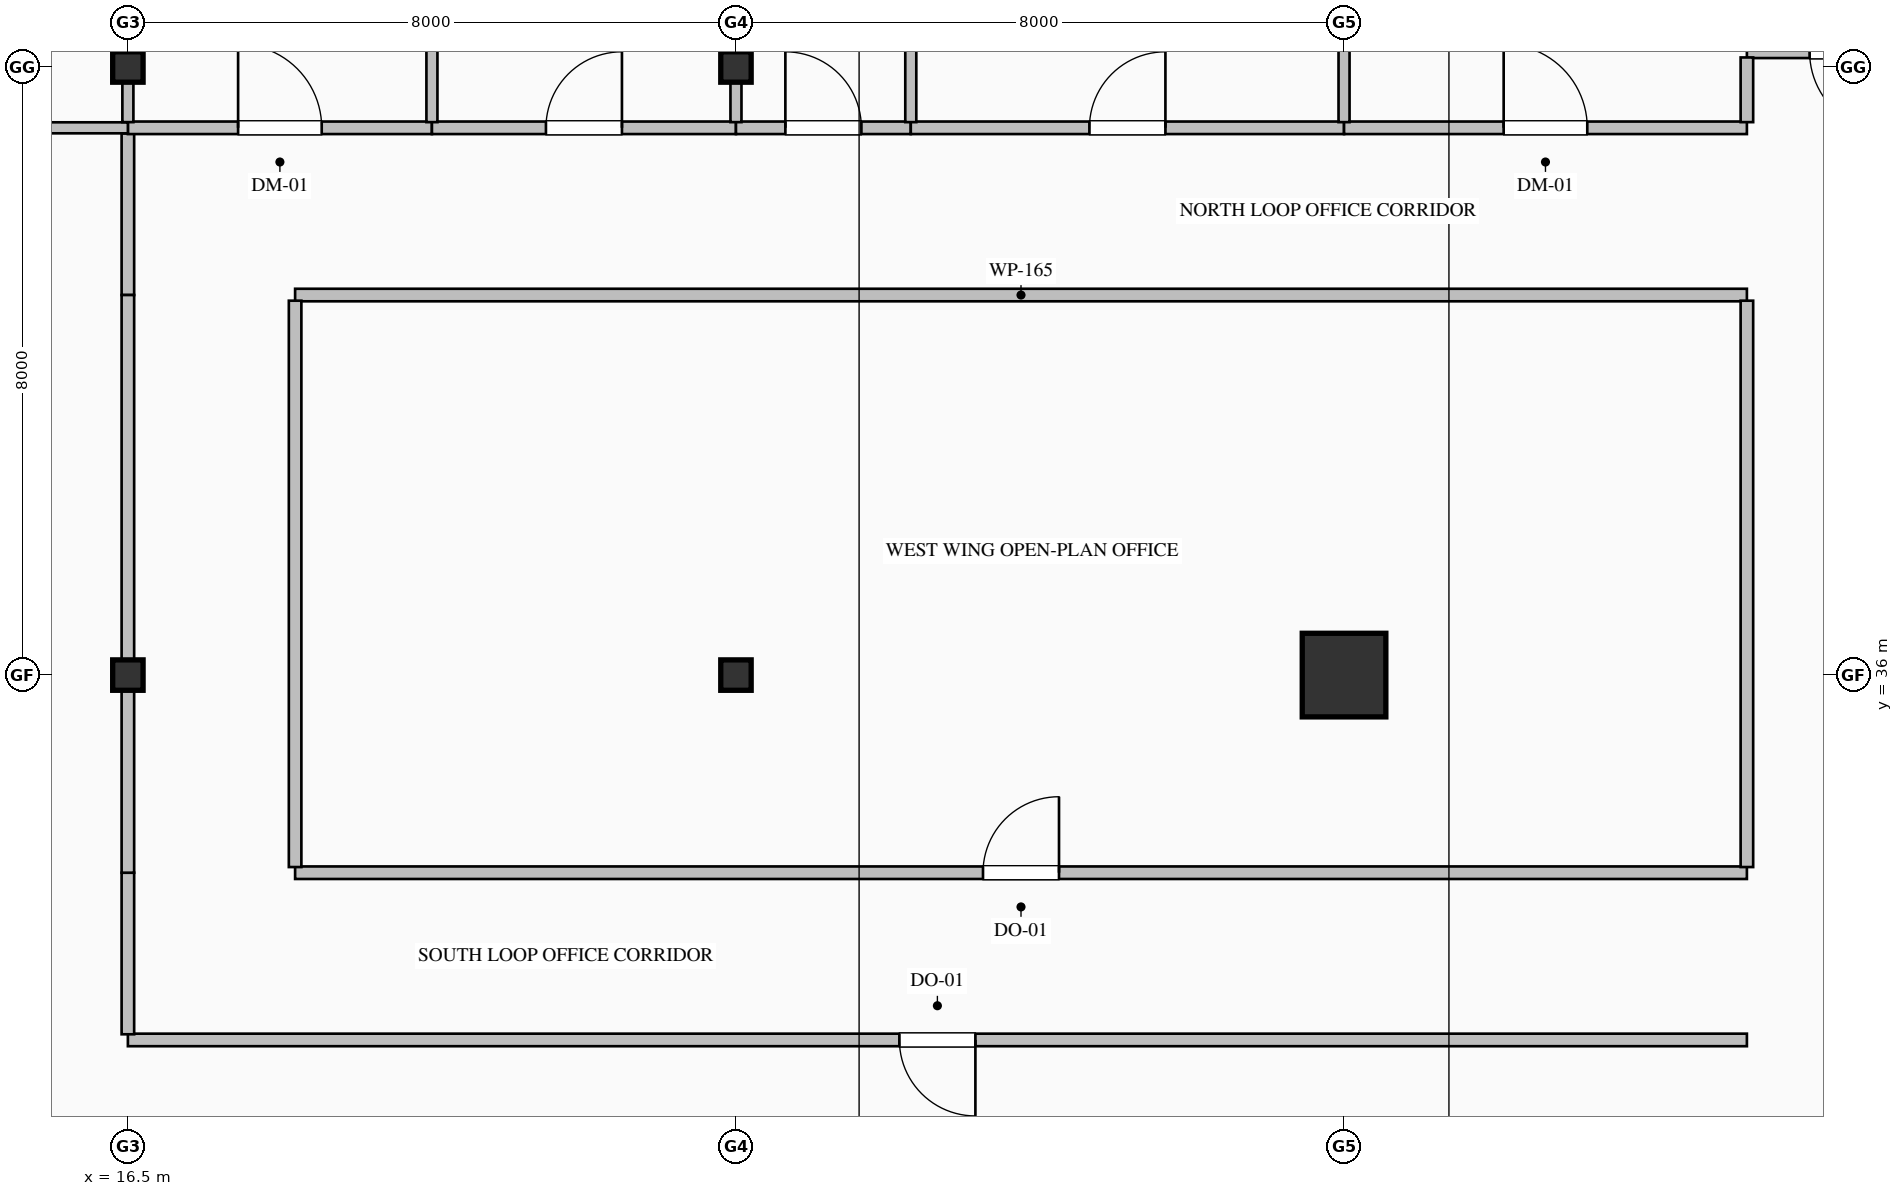
"""IFC4 building model, lengths in metres.
Left out: names, types, materials, properties, quantities, classifications, styles, units other than length and angle.
Written with IfcOpenShell. Run it as: python <this file> out.ifc"""

import sys

from ifc_helpers import new_model, si_unit, direction, frame, frame_2d, origin, origin_2d, place, context, subcontext, project, spatial, rectangle, hollow_rectangle, i_section, extrude, element, fill, save


model = new_model("IFC4")
c1 = context("Model", 3, precision=1e-05, world=origin(), true_north=direction((0.0, 1.0)))
c2 = subcontext(c1, "Body", "Model", "MODEL_VIEW")
j1 = project(units=[si_unit("LENGTHUNIT", "METRE"), si_unit("PLANEANGLEUNIT", "RADIAN")], contexts=[c1])
p1 = place(None, origin())
s1 = spatial("IfcSite", under=j1, at=p1, CompositionType="ELEMENT")
p2 = place(p1, origin())
s2 = spatial("IfcBuilding", under=s1, at=p2, CompositionType="ELEMENT")
p3 = place(p2, frame((0.0, 0.0, 119.0)))
s3 = spatial("IfcBuildingStorey", under=s2, at=p3, CompositionType="ELEMENT", Elevation=119.0)
for number, where, z_axis, x_axis in (
    (1, (16.5, 36.0, 0.0), (0.0, 0.0, 1.0), (1.0, 0.0, 0.0)),
    (2, (16.5, 44.0, 0.0), (0.0, 0.0, 1.0), (1.0, 0.0, 0.0)),
    (3, (24.5, 36.0, 0.0), (0.0, 0.0, 1.0), (1.0, 0.0, 0.0)),
    (4, (24.5, 44.0, 0.0), (0.0, 0.0, 1.0), (1.0, 0.0, 0.0)),
):
    element("IfcColumn", number, at=place(p3, frame(where, z_axis=z_axis, x_axis=x_axis)), inside=s3, PredefinedType="COLUMN", context=c2, shape_type="SweptSolid", body=[
        extrude(i_section(OverallWidth=0.4, OverallDepth=0.4, WebThickness=0.013, FlangeThickness=0.021, FilletRadius=0.022, at=origin_2d()), origin(), (0.0, 0.0, 1.0), 4.0),
    ])
p4 = place(p3, frame((32.5, 36.0, 0.0), z_axis=(0.0, 0.0, 1.0), x_axis=(1.0, 0.0, 0.0)))
e5 = element("IfcColumn", 5, at=p4, inside=s3, PredefinedType="COLUMN", context=c2, shape_type="SweptSolid", body=[
    extrude(hollow_rectangle(XDim=1.1, YDim=1.1, WallThickness=0.04, at=origin_2d()), origin(), (0.0, 0.0, 1.0), 4.0),
])
p5 = place(p3, frame((40.5, 44.2, 0.0), z_axis=(0.0, 0.0, 1.0), x_axis=(-1.0, 0.0, 0.0)))
e6 = element("IfcWall", 6, at=p5, inside=s3, PredefinedType="PARTITIONING", context=c2, shape_type="SweptSolid", body=[
    extrude(rectangle(XDim=2.7, YDim=0.165, at=frame_2d((1.35, 0.0))), origin(), (0.0, 0.0, 1.0), 3.765),
])
p6 = place(p5, frame((0.825, 0.0, 0.0)))
e7 = element("IfcOpeningElement", 7, at=p6, cuts=e6, PredefinedType="OPENING", context=c2, shape_type="SweptSolid", body=[
    extrude(rectangle(XDim=1.05, YDim=2.15, at=frame_2d((0.525, 1.075))), frame((0.0, 0.093, 0.0), z_axis=(0.0, -1.0, 0.0), x_axis=(1.0, 0.0, 0.0)), (0.0, 0.0, 1.0), 0.185),
])
p7 = place(p3, frame((37.8, 31.2, 0.0), z_axis=(0.0, 0.0, 1.0), x_axis=(-1.0, 0.0, 0.0)))
e8 = element("IfcWall", 8, at=p7, inside=s3, PredefinedType="PARTITIONING", context=c2, shape_type="SweptSolid", body=[
    extrude(rectangle(XDim=21.3, YDim=0.165, at=frame_2d((10.65, 0.0))), origin(), (0.0, 0.0, 1.0), 3.765),
])
p8 = place(p7, frame((10.15, 0.0, 0.0)))
e9 = element("IfcOpeningElement", 9, at=p8, cuts=e8, PredefinedType="OPENING", context=c2, shape_type="SweptSolid", body=[
    extrude(rectangle(XDim=1.0, YDim=2.15, at=frame_2d((0.5, 1.075))), frame((0.0, 0.093, 0.0), z_axis=(0.0, -1.0, 0.0), x_axis=(1.0, 0.0, 0.0)), (0.0, 0.0, 1.0), 0.185),
])
p9 = place(p3, frame((16.5, 31.274, 0.0), z_axis=(0.0, 0.0, 1.0), x_axis=(0.0, 1.0, 0.0)))
e10 = element("IfcWall", 10, at=p9, inside=s3, PredefinedType="PARTITIONING", context=c2, shape_type="SweptSolid", body=[
    extrude(rectangle(XDim=2.125, YDim=0.165, at=frame_2d((1.063, 0.0))), origin(), (0.0, 0.0, 1.0), 3.157),
])
p10 = place(p3, frame((18.7, 33.4, 0.0), z_axis=(0.0, 0.0, 1.0), x_axis=(1.0, 0.0, 0.0)))
e11 = element("IfcWall", 11, at=p10, inside=s3, PredefinedType="PARTITIONING", context=c2, shape_type="SweptSolid", body=[
    extrude(rectangle(XDim=19.1, YDim=0.165, at=frame_2d((9.55, 0.0))), origin(), (0.0, 0.0, 1.0), 3.765),
])
p11 = place(p10, frame((9.05, 0.0, 0.0)))
e12 = element("IfcOpeningElement", 12, at=p11, cuts=e11, PredefinedType="OPENING", context=c2, shape_type="SweptSolid", body=[
    extrude(rectangle(XDim=1.0, YDim=2.15, at=frame_2d((0.5, 1.075))), frame((0.0, 0.093, 0.0), z_axis=(0.0, -1.0, 0.0), x_axis=(1.0, 0.0, 0.0)), (0.0, 0.0, 1.0), 0.185),
])
p12 = place(p3, frame((16.5, 41.0, 0.0), z_axis=(0.0, 0.0, 1.0), x_axis=(0.0, 1.0, 0.0)))
e13 = element("IfcWall", 13, at=p12, inside=s3, PredefinedType="PARTITIONING", context=c2, shape_type="SweptSolid", body=[
    extrude(rectangle(XDim=2.125, YDim=0.165, at=frame_2d((1.063, 0.0))), origin(), (0.0, 0.0, 1.0), 3.157),
])
p13 = place(p3, frame((37.8, 41.0, 0.0), z_axis=(0.0, 0.0, 1.0), x_axis=(-1.0, 0.0, 0.0)))
e14 = element("IfcWall", 14, at=p13, inside=s3, PredefinedType="PARTITIONING", context=c2, shape_type="SweptSolid", body=[
    extrude(rectangle(XDim=19.1, YDim=0.165, at=frame_2d((9.55, 0.0))), origin(), (0.0, 0.0, 1.0), 3.765),
])
p14 = place(p3, frame((16.5, 43.2, 0.0), z_axis=(0.0, 0.0, 1.0), x_axis=(1.0, 0.0, 0.0)))
e15 = element("IfcWall", 15, at=p14, inside=s3, PredefinedType="PARTITIONING", context=c2, shape_type="SweptSolid", body=[
    extrude(rectangle(XDim=4.0, YDim=0.165, at=frame_2d((2.0, 0.0))), origin(), (0.0, 0.0, 1.0), 3.765),
])
p15 = place(p14, frame((1.45, 0.0, 0.0)))
e16 = element("IfcOpeningElement", 16, at=p15, cuts=e15, PredefinedType="OPENING", context=c2, shape_type="SweptSolid", body=[
    extrude(rectangle(XDim=1.1, YDim=2.2, at=frame_2d((0.55, 1.1))), frame((0.0, 0.093, 0.0), z_axis=(0.0, -1.0, 0.0), x_axis=(1.0, 0.0, 0.0)), (0.0, 0.0, 1.0), 0.185),
])
p16 = place(p3, frame((20.5, 43.2, 0.0), z_axis=(0.0, 0.0, 1.0), x_axis=(1.0, 0.0, 0.0)))
e17 = element("IfcWall", 17, at=p16, inside=s3, PredefinedType="PARTITIONING", context=c2, shape_type="SweptSolid", body=[
    extrude(rectangle(XDim=4.0, YDim=0.165, at=frame_2d((2.0, 0.0))), origin(), (0.0, 0.0, 1.0), 3.765),
])
p17 = place(p16, frame((1.5, 0.0, 0.0)))
e18 = element("IfcOpeningElement", 18, at=p17, cuts=e17, PredefinedType="OPENING", context=c2, shape_type="SweptSolid", body=[
    extrude(rectangle(XDim=1.0, YDim=2.15, at=frame_2d((0.5, 1.075))), frame((0.0, 0.093, 0.0), z_axis=(0.0, -1.0, 0.0), x_axis=(1.0, 0.0, 0.0)), (0.0, 0.0, 1.0), 0.185),
])
p18 = place(p3, frame((24.5, 43.2, 0.0), z_axis=(0.0, 0.0, 1.0), x_axis=(1.0, 0.0, 0.0)))
e19 = element("IfcWall", 19, at=p18, inside=s3, PredefinedType="PARTITIONING", context=c2, shape_type="SweptSolid", body=[
    extrude(rectangle(XDim=2.3, YDim=0.165, at=frame_2d((1.15, 0.0))), origin(), (0.0, 0.0, 1.0), 3.765),
])
p19 = place(p18, frame((0.65, 0.0, 0.0)))
e20 = element("IfcOpeningElement", 20, at=p19, cuts=e19, PredefinedType="OPENING", context=c2, shape_type="SweptSolid", body=[
    extrude(rectangle(XDim=1.0, YDim=2.15, at=frame_2d((0.5, 1.075))), frame((0.0, 0.093, 0.0), z_axis=(0.0, -1.0, 0.0), x_axis=(1.0, 0.0, 0.0)), (0.0, 0.0, 1.0), 0.185),
])
p20 = place(p3, frame((26.8, 43.2, 0.0), z_axis=(0.0, 0.0, 1.0), x_axis=(1.0, 0.0, 0.0)))
e21 = element("IfcWall", 21, at=p20, inside=s3, PredefinedType="PARTITIONING", context=c2, shape_type="SweptSolid", body=[
    extrude(rectangle(XDim=5.7, YDim=0.165, at=frame_2d((2.85, 0.0))), origin(), (0.0, 0.0, 1.0), 3.765),
])
p21 = place(p20, frame((2.35, 0.0, 0.0)))
e22 = element("IfcOpeningElement", 22, at=p21, cuts=e21, PredefinedType="OPENING", context=c2, shape_type="SweptSolid", body=[
    extrude(rectangle(XDim=1.0, YDim=2.15, at=frame_2d((0.5, 1.075))), frame((0.0, 0.093, 0.0), z_axis=(0.0, -1.0, 0.0), x_axis=(1.0, 0.0, 0.0)), (0.0, 0.0, 1.0), 0.185),
])
p22 = place(p3, frame((32.5, 43.2, 0.0), z_axis=(0.0, 0.0, 1.0), x_axis=(1.0, 0.0, 0.0)))
e23 = element("IfcWall", 23, at=p22, inside=s3, PredefinedType="PARTITIONING", context=c2, shape_type="SweptSolid", body=[
    extrude(rectangle(XDim=5.3, YDim=0.165, at=frame_2d((2.65, 0.0))), origin(), (0.0, 0.0, 1.0), 3.765),
])
p23 = place(p22, frame((2.1, 0.0, 0.0)))
e24 = element("IfcOpeningElement", 24, at=p23, cuts=e23, PredefinedType="OPENING", context=c2, shape_type="SweptSolid", body=[
    extrude(rectangle(XDim=1.1, YDim=2.2, at=frame_2d((0.55, 1.1))), frame((0.0, 0.093, 0.0), z_axis=(0.0, -1.0, 0.0), x_axis=(1.0, 0.0, 0.0)), (0.0, 0.0, 1.0), 0.185),
])
p24 = place(p3, frame((16.5, 33.4, 0.0), z_axis=(0.0, 0.0, 1.0), x_axis=(0.0, 1.0, 0.0)))
e25 = element("IfcWall", 25, at=p24, inside=s3, PredefinedType="PARTITIONING", context=c2, shape_type="SweptSolid", body=[
    extrude(rectangle(XDim=7.6, YDim=0.165, at=frame_2d((3.8, 0.0))), origin(), (0.0, 0.0, 1.0), 3.157),
])
for number, where, z_axis, x_axis in (
    (26, (18.7, 40.926, 0.0), (0.0, 0.0, 1.0), (0.0, -1.0, 0.0)),
    (27, (37.8, 33.475, 0.0), (0.0, 0.0, 1.0), (0.0, 1.0, 0.0)),
):
    element("IfcWall", number, at=place(p3, frame(where, z_axis=z_axis, x_axis=x_axis)), inside=s3, PredefinedType="PARTITIONING", context=c2, shape_type="SweptSolid", body=[
        extrude(rectangle(XDim=7.451, YDim=0.165, at=frame_2d((3.726, 0.0))), origin(), (0.0, 0.0, 1.0), 3.765),
    ])
p25 = place(p3, frame((37.8, 43.274, 0.0), z_axis=(0.0, 0.0, 1.0), x_axis=(0.0, 1.0, 0.0)))
e28 = element("IfcWall", 28, at=p25, inside=s3, PredefinedType="PARTITIONING", context=c2, shape_type="SweptSolid", body=[
    extrude(rectangle(XDim=0.851, YDim=0.165, at=frame_2d((0.426, 0.0))), origin(), (0.0, 0.0, 1.0), 3.765),
])
p26 = place(p3, frame((12.8, 43.2, 0.0), z_axis=(0.0, 0.0, 1.0), x_axis=(1.0, 0.0, 0.0)))
e29 = element("IfcWall", 29, at=p26, inside=s3, PredefinedType="PARTITIONING", context=c2, shape_type="SweptSolid", body=[
    extrude(rectangle(XDim=3.7, YDim=0.145, at=frame_2d((1.85, 0.0))), origin(), (0.0, 0.0, 1.0), 3.765),
])
p27 = place(p3, frame((16.5, 51.668, 0.0), z_axis=(0.0, 0.0, 1.0), x_axis=(0.0, -1.0, 0.0)))
e30 = element("IfcWall", 30, at=p27, inside=s3, PredefinedType="PARTITIONING", context=c2, shape_type="SweptSolid", body=[
    extrude(rectangle(XDim=8.394, YDim=0.145, at=frame_2d((4.197, 0.0))), origin(), (0.0, 0.0, 1.0), 3.157),
])
p28 = place(p27, frame((3.697, 0.0, 0.0)))
e31 = element("IfcOpeningElement", 31, at=p28, cuts=e30, PredefinedType="OPENING", context=c2, shape_type="SweptSolid", body=[
    extrude(rectangle(XDim=1.0, YDim=2.15, at=frame_2d((0.5, 1.075))), frame((0.0, 0.083, 0.0), z_axis=(0.0, -1.0, 0.0), x_axis=(1.0, 0.0, 0.0)), (0.0, 0.0, 1.0), 0.165),
])
p29 = place(p3, frame((20.5, 51.668, 0.0), z_axis=(0.0, 0.0, 1.0), x_axis=(0.0, -1.0, 0.0)))
e32 = element("IfcWall", 32, at=p29, inside=s3, PredefinedType="PARTITIONING", context=c2, shape_type="SweptSolid", body=[
    extrude(rectangle(XDim=8.394, YDim=0.145, at=frame_2d((4.197, 0.0))), origin(), (0.0, 0.0, 1.0), 3.765),
])
p30 = place(p3, frame((24.5, 51.668, 0.0), z_axis=(0.0, 0.0, 1.0), x_axis=(0.0, -1.0, 0.0)))
e33 = element("IfcWall", 33, at=p30, inside=s3, PredefinedType="PARTITIONING", context=c2, shape_type="SweptSolid", body=[
    extrude(rectangle(XDim=8.394, YDim=0.145, at=frame_2d((4.197, 0.0))), origin(), (0.0, 0.0, 1.0), 3.157),
])
for number, where, z_axis, x_axis in (
    (34, (26.8, 51.668, 0.0), (0.0, 0.0, 1.0), (0.0, -1.0, 0.0)),
    (35, (32.5, 51.668, 0.0), (0.0, 0.0, 1.0), (0.0, -1.0, 0.0)),
):
    element("IfcWall", number, at=place(p3, frame(where, z_axis=z_axis, x_axis=x_axis)), inside=s3, PredefinedType="PARTITIONING", context=c2, shape_type="SweptSolid", body=[
        extrude(rectangle(XDim=8.394, YDim=0.145, at=frame_2d((4.197, 0.0))), origin(), (0.0, 0.0, 1.0), 3.765),
    ])
p31 = place(p6, origin())
e36 = element("IfcDoor", 36, at=p31, inside=s3, OperationType="SINGLE_SWING_LEFT", PredefinedType="DOOR", context=c2, shape_type="SweptSolid", body=[
    extrude(rectangle(XDim=1.05, YDim=2.15, at=frame_2d((0.525, 1.075))), frame((0.0, 0.025, 0.0), z_axis=(0.0, -1.0, 0.0), x_axis=(1.0, 0.0, 0.0)), (0.0, 0.0, 1.0), 0.05),
])
fill(e7, e36)
p32 = place(p8, origin())
e37 = element("IfcDoor", 37, at=p32, inside=s3, OperationType="SINGLE_SWING_LEFT", PredefinedType="DOOR", context=c2, shape_type="SweptSolid", body=[
    extrude(rectangle(XDim=1.0, YDim=2.15, at=frame_2d((0.5, 1.075))), frame((0.0, 0.025, 0.0), z_axis=(0.0, -1.0, 0.0), x_axis=(1.0, 0.0, 0.0)), (0.0, 0.0, 1.0), 0.05),
])
fill(e9, e37)
p33 = place(p11, origin())
e38 = element("IfcDoor", 38, at=p33, inside=s3, OperationType="SINGLE_SWING_RIGHT", PredefinedType="DOOR", context=c2, shape_type="SweptSolid", body=[
    extrude(rectangle(XDim=1.0, YDim=2.15, at=frame_2d((0.5, 1.075))), frame((0.0, 0.025, 0.0), z_axis=(0.0, -1.0, 0.0), x_axis=(1.0, 0.0, 0.0)), (0.0, 0.0, 1.0), 0.05),
])
fill(e12, e38)
p34 = place(p15, origin())
e39 = element("IfcDoor", 39, at=p34, inside=s3, OperationType="SINGLE_SWING_LEFT", PredefinedType="DOOR", context=c2, shape_type="SweptSolid", body=[
    extrude(rectangle(XDim=1.1, YDim=2.2, at=frame_2d((0.55, 1.1))), frame((0.0, 0.025, 0.0), z_axis=(0.0, -1.0, 0.0), x_axis=(1.0, 0.0, 0.0)), (0.0, 0.0, 1.0), 0.05),
])
fill(e16, e39)
p35 = place(p17, origin())
e40 = element("IfcDoor", 40, at=p35, inside=s3, OperationType="SINGLE_SWING_RIGHT", PredefinedType="DOOR", context=c2, shape_type="SweptSolid", body=[
    extrude(rectangle(XDim=1.0, YDim=2.15, at=frame_2d((0.5, 1.075))), frame((0.0, 0.025, 0.0), z_axis=(0.0, -1.0, 0.0), x_axis=(1.0, 0.0, 0.0)), (0.0, 0.0, 1.0), 0.05),
])
fill(e18, e40)
p36 = place(p19, origin())
e41 = element("IfcDoor", 41, at=p36, inside=s3, OperationType="SINGLE_SWING_LEFT", PredefinedType="DOOR", context=c2, shape_type="SweptSolid", body=[
    extrude(rectangle(XDim=1.0, YDim=2.15, at=frame_2d((0.5, 1.075))), frame((0.0, 0.025, 0.0), z_axis=(0.0, -1.0, 0.0), x_axis=(1.0, 0.0, 0.0)), (0.0, 0.0, 1.0), 0.05),
])
fill(e20, e41)
p37 = place(p21, origin())
e42 = element("IfcDoor", 42, at=p37, inside=s3, OperationType="SINGLE_SWING_RIGHT", PredefinedType="DOOR", context=c2, shape_type="SweptSolid", body=[
    extrude(rectangle(XDim=1.0, YDim=2.15, at=frame_2d((0.5, 1.075))), frame((0.0, 0.025, 0.0), z_axis=(0.0, -1.0, 0.0), x_axis=(1.0, 0.0, 0.0)), (0.0, 0.0, 1.0), 0.05),
])
fill(e22, e42)
p38 = place(p23, origin())
e43 = element("IfcDoor", 43, at=p38, inside=s3, OperationType="SINGLE_SWING_LEFT", PredefinedType="DOOR", context=c2, shape_type="SweptSolid", body=[
    extrude(rectangle(XDim=1.1, YDim=2.2, at=frame_2d((0.55, 1.1))), frame((0.0, 0.025, 0.0), z_axis=(0.0, -1.0, 0.0), x_axis=(1.0, 0.0, 0.0)), (0.0, 0.0, 1.0), 0.05),
])
fill(e24, e43)
save(model, sys.argv[1])
